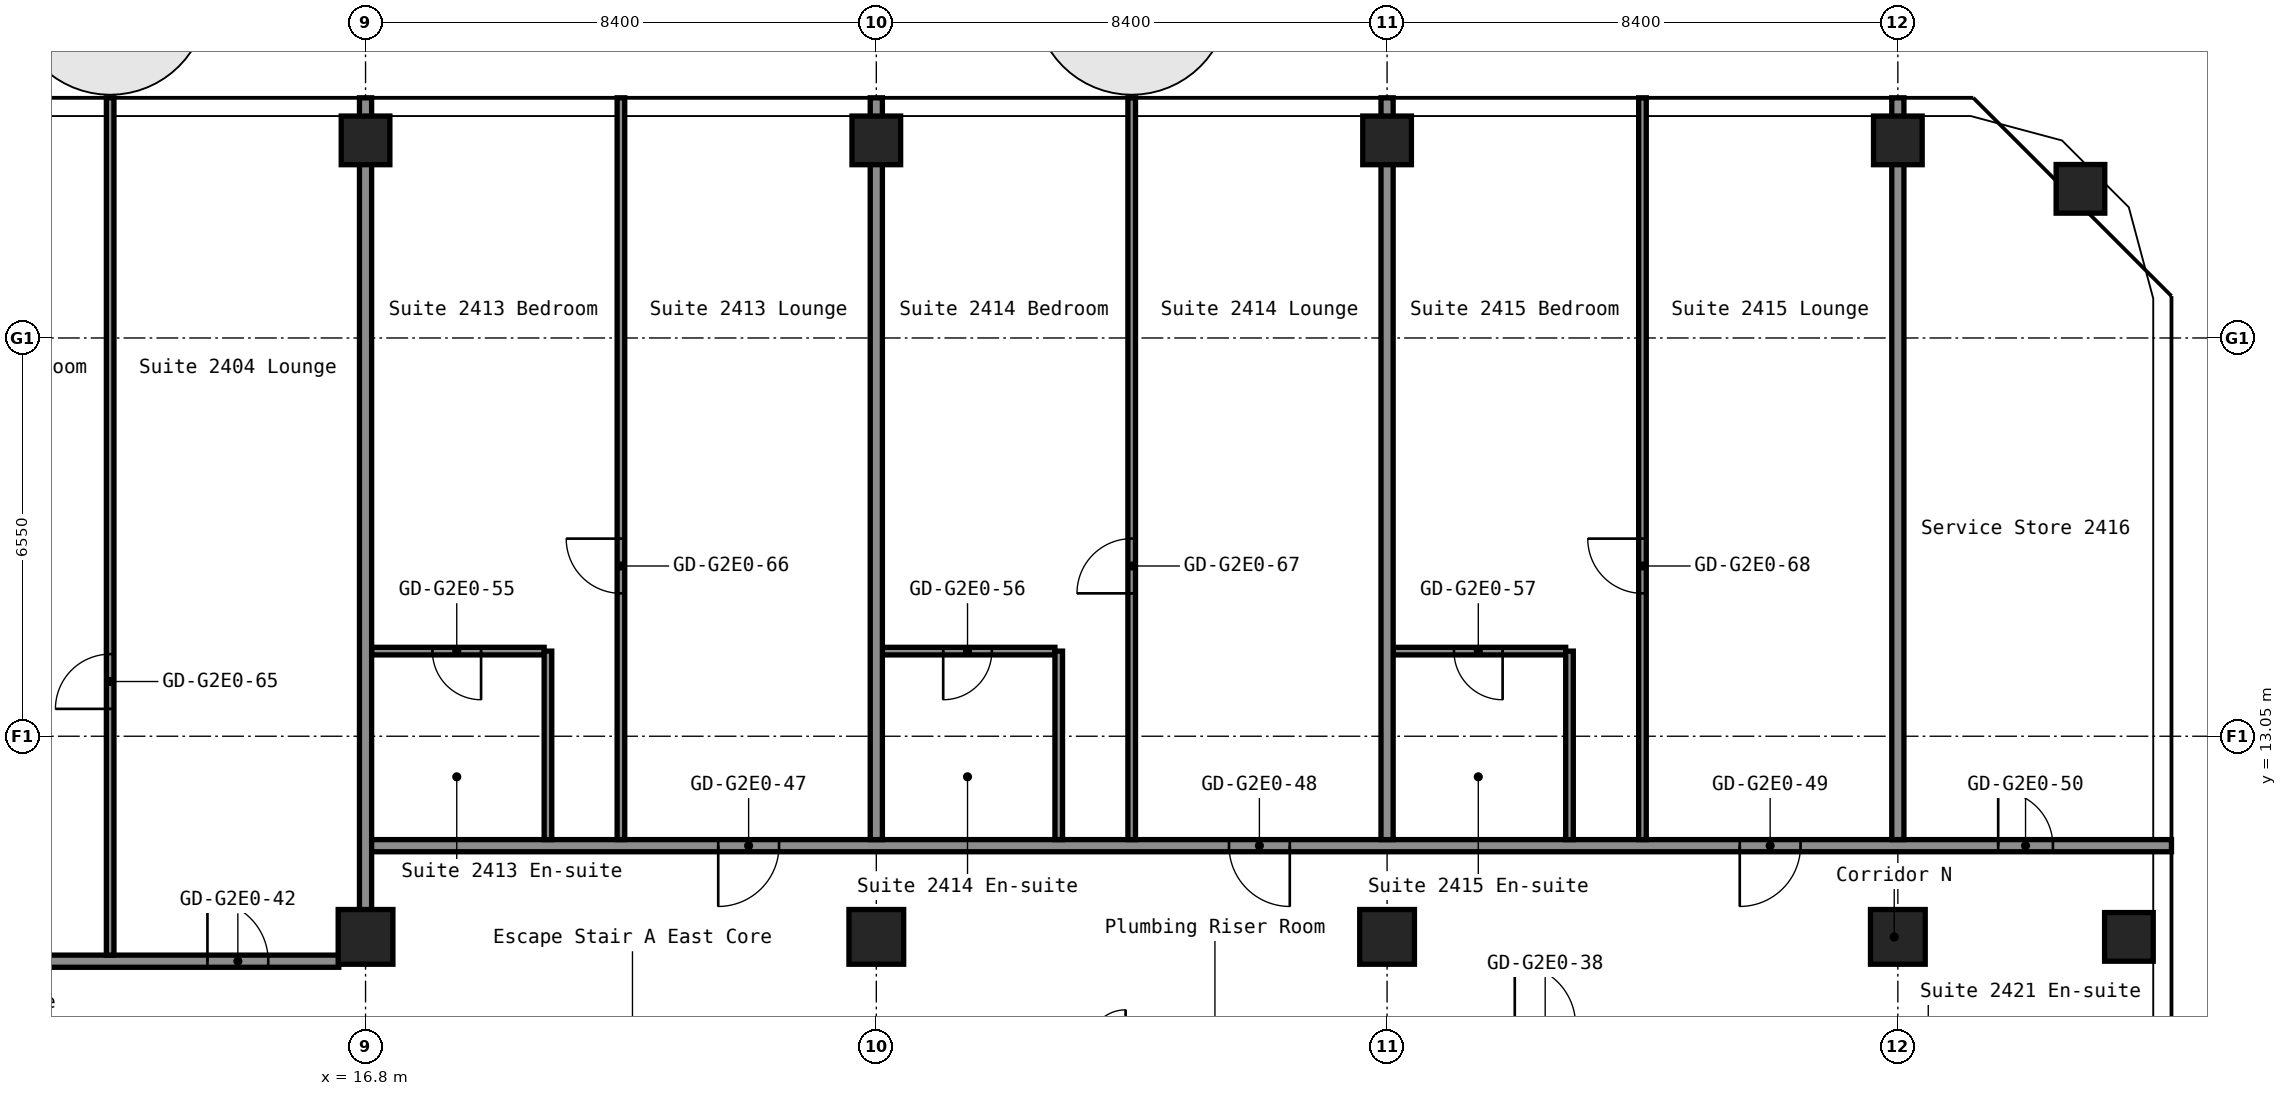
"""IFC4 building model, lengths in metres.
Left out: names, types, materials, properties, quantities, classifications, styles, units other than length and angle.
Written with IfcOpenShell. Run it as: python <this file> out.ifc"""

import sys

from ifc_helpers import new_model, si_unit, direction, frame, frame_2d, origin, origin_2d, place, context, subcontext, project, spatial, rectangle, hollow_rectangle, extrude, element, fill, save


model = new_model("IFC4")
c1 = context("Model", 3, precision=1e-05, world=origin(), true_north=direction((0.0, 1.0)))
c2 = subcontext(c1, "Body", "Model", "MODEL_VIEW")
j1 = project(units=[si_unit("LENGTHUNIT", "METRE"), si_unit("PLANEANGLEUNIT", "RADIAN")], contexts=[c1])
p1 = place(None, origin())
s1 = spatial("IfcSite", under=j1, at=p1, CompositionType="ELEMENT")
p2 = place(p1, origin())
s2 = spatial("IfcBuilding", under=s1, at=p2, CompositionType="ELEMENT")
p3 = place(p2, frame((0.0, 0.0, 88.2)))
s3 = spatial("IfcBuildingStorey", under=s2, at=p3, CompositionType="ELEMENT", Elevation=88.2)
p4 = place(p3, frame((16.8, 9.75, 0.0), z_axis=(0.0, 0.0, 1.0), x_axis=(1.0, 0.0, 0.0)))
e1 = element("IfcColumn", 1, at=p4, inside=s3, PredefinedType="COLUMN", context=c2, shape_type="SweptSolid", body=[
    extrude(hollow_rectangle(XDim=0.9, YDim=0.9, WallThickness=0.036, at=origin_2d()), origin(), (0.0, 0.0, 1.0), 2.8),
])
p5 = place(p3, frame((16.8, 22.85, 0.0), z_axis=(0.0, 0.0, 1.0), x_axis=(1.0, 0.0, 0.0)))
e2 = element("IfcColumn", 2, at=p5, inside=s3, PredefinedType="COLUMN", context=c2, shape_type="SweptSolid", body=[
    extrude(hollow_rectangle(XDim=0.8, YDim=0.8, WallThickness=0.032, at=origin_2d()), origin(), (0.0, 0.0, 1.0), 2.8),
])
p6 = place(p3, frame((25.2, 9.75, 0.0), z_axis=(0.0, 0.0, 1.0), x_axis=(1.0, 0.0, 0.0)))
e3 = element("IfcColumn", 3, at=p6, inside=s3, PredefinedType="COLUMN", context=c2, shape_type="SweptSolid", body=[
    extrude(hollow_rectangle(XDim=0.9, YDim=0.9, WallThickness=0.036, at=origin_2d()), origin(), (0.0, 0.0, 1.0), 2.8),
])
p7 = place(p3, frame((25.2, 22.85, 0.0), z_axis=(0.0, 0.0, 1.0), x_axis=(1.0, 0.0, 0.0)))
e4 = element("IfcColumn", 4, at=p7, inside=s3, PredefinedType="COLUMN", context=c2, shape_type="SweptSolid", body=[
    extrude(hollow_rectangle(XDim=0.8, YDim=0.8, WallThickness=0.032, at=origin_2d()), origin(), (0.0, 0.0, 1.0), 2.8),
])
p8 = place(p3, frame((33.6, 9.75, 0.0), z_axis=(0.0, 0.0, 1.0), x_axis=(1.0, 0.0, 0.0)))
e5 = element("IfcColumn", 5, at=p8, inside=s3, PredefinedType="COLUMN", context=c2, shape_type="SweptSolid", body=[
    extrude(hollow_rectangle(XDim=0.9, YDim=0.9, WallThickness=0.036, at=origin_2d()), origin(), (0.0, 0.0, 1.0), 2.8),
])
p9 = place(p3, frame((33.6, 22.85, 0.0), z_axis=(0.0, 0.0, 1.0), x_axis=(1.0, 0.0, 0.0)))
e6 = element("IfcColumn", 6, at=p9, inside=s3, PredefinedType="COLUMN", context=c2, shape_type="SweptSolid", body=[
    extrude(hollow_rectangle(XDim=0.8, YDim=0.8, WallThickness=0.032, at=origin_2d()), origin(), (0.0, 0.0, 1.0), 2.8),
])
p10 = place(p3, frame((42.0, 9.75, 0.0), z_axis=(0.0, 0.0, 1.0), x_axis=(1.0, 0.0, 0.0)))
e7 = element("IfcColumn", 7, at=p10, inside=s3, PredefinedType="COLUMN", context=c2, shape_type="SweptSolid", body=[
    extrude(hollow_rectangle(XDim=0.9, YDim=0.9, WallThickness=0.036, at=origin_2d()), origin(), (0.0, 0.0, 1.0), 2.8),
])
for number, where, z_axis, x_axis in (
    (8, (42.0, 22.85, 0.0), (0.0, 0.0, 1.0), (1.0, 0.0, 0.0)),
    (9, (45.8, 9.75, 0.0), (0.0, 0.0, 1.0), (1.0, 0.0, 0.0)),
    (10, (45.003, 22.053, 0.0), (0.0, 0.0, 1.0), (1.0, 0.0, 0.0)),
):
    element("IfcColumn", number, at=place(p3, frame(where, z_axis=z_axis, x_axis=x_axis)), inside=s3, PredefinedType="COLUMN", context=c2, shape_type="SweptSolid", body=[
        extrude(hollow_rectangle(XDim=0.8, YDim=0.8, WallThickness=0.032, at=origin_2d()), origin(), (0.0, 0.0, 1.0), 2.8),
    ])
p11 = place(p3, frame((-16.36, 9.35, 0.0), z_axis=(0.0, 0.0, 1.0), x_axis=(1.0, 0.0, 0.0)))
e11 = element("IfcWall", 11, at=p11, inside=s3, PredefinedType="PARTITIONING", context=c2, shape_type="SweptSolid", body=[
    extrude(rectangle(XDim=32.72, YDim=0.2, at=frame_2d((16.36, 0.0))), origin(), (0.0, 0.0, 1.0), 2.8),
])
p12 = place(p11, frame((1.16, 0.0, 0.0)))
e12 = element("IfcOpeningElement", 12, at=p12, cuts=e11, PredefinedType="OPENING", context=c2, shape_type="SweptSolid", body=[
    extrude(rectangle(XDim=1.0, YDim=2.1, at=frame_2d((0.5, 1.05))), frame((0.0, 0.11, 0.0), z_axis=(0.0, -1.0, 0.0), x_axis=(1.0, 0.0, 0.0)), (0.0, 0.0, 1.0), 0.22),
])
p13 = place(p11, frame((9.56, 0.0, 0.0)))
e13 = element("IfcOpeningElement", 13, at=p13, cuts=e11, PredefinedType="OPENING", context=c2, shape_type="SweptSolid", body=[
    extrude(rectangle(XDim=1.0, YDim=2.1, at=frame_2d((0.5, 1.05))), frame((0.0, 0.11, 0.0), z_axis=(0.0, -1.0, 0.0), x_axis=(1.0, 0.0, 0.0)), (0.0, 0.0, 1.0), 0.22),
])
p14 = place(p11, frame((22.16, 0.0, 0.0)))
e14 = element("IfcOpeningElement", 14, at=p14, cuts=e11, PredefinedType="OPENING", context=c2, shape_type="SweptSolid", body=[
    extrude(rectangle(XDim=1.0, YDim=2.1, at=frame_2d((0.5, 1.05))), frame((0.0, 0.11, 0.0), z_axis=(0.0, -1.0, 0.0), x_axis=(1.0, 0.0, 0.0)), (0.0, 0.0, 1.0), 0.22),
])
p15 = place(p11, frame((30.56, 0.0, 0.0)))
e15 = element("IfcOpeningElement", 15, at=p15, cuts=e11, PredefinedType="OPENING", context=c2, shape_type="SweptSolid", body=[
    extrude(rectangle(XDim=1.0, YDim=2.1, at=frame_2d((0.5, 1.05))), frame((0.0, 0.11, 0.0), z_axis=(0.0, -1.0, 0.0), x_axis=(1.0, 0.0, 0.0)), (0.0, 0.0, 1.0), 0.22),
])
p16 = place(p3, frame((16.8, 11.25, 0.0), z_axis=(0.0, 0.0, 1.0), x_axis=(1.0, 0.0, 0.0)))
e16 = element("IfcWall", 16, at=p16, inside=s3, PredefinedType="PARTITIONING", context=c2, shape_type="SweptSolid", body=[
    extrude(rectangle(XDim=29.7, YDim=0.2, at=frame_2d((14.85, 0.0))), origin(), (0.0, 0.0, 1.0), 2.8),
])
p17 = place(p16, frame((5.8, 0.0, 0.0)))
e17 = element("IfcOpeningElement", 17, at=p17, cuts=e16, PredefinedType="OPENING", context=c2, shape_type="SweptSolid", body=[
    extrude(rectangle(XDim=1.0, YDim=2.1, at=frame_2d((0.5, 1.05))), frame((0.0, 0.11, 0.0), z_axis=(0.0, -1.0, 0.0), x_axis=(1.0, 0.0, 0.0)), (0.0, 0.0, 1.0), 0.22),
])
p18 = place(p16, frame((14.2, 0.0, 0.0)))
e18 = element("IfcOpeningElement", 18, at=p18, cuts=e16, PredefinedType="OPENING", context=c2, shape_type="SweptSolid", body=[
    extrude(rectangle(XDim=1.0, YDim=2.1, at=frame_2d((0.5, 1.05))), frame((0.0, 0.11, 0.0), z_axis=(0.0, -1.0, 0.0), x_axis=(1.0, 0.0, 0.0)), (0.0, 0.0, 1.0), 0.22),
])
p19 = place(p16, frame((22.6, 0.0, 0.0)))
e19 = element("IfcOpeningElement", 19, at=p19, cuts=e16, PredefinedType="OPENING", context=c2, shape_type="SweptSolid", body=[
    extrude(rectangle(XDim=1.0, YDim=2.1, at=frame_2d((0.5, 1.05))), frame((0.0, 0.11, 0.0), z_axis=(0.0, -1.0, 0.0), x_axis=(1.0, 0.0, 0.0)), (0.0, 0.0, 1.0), 0.22),
])
p20 = place(p16, frame((26.85, 0.0, 0.0)))
e20 = element("IfcOpeningElement", 20, at=p20, cuts=e16, PredefinedType="OPENING", context=c2, shape_type="SweptSolid", body=[
    extrude(rectangle(XDim=0.9, YDim=2.1, at=frame_2d((0.45, 1.05))), frame((0.0, 0.11, 0.0), z_axis=(0.0, -1.0, 0.0), x_axis=(1.0, 0.0, 0.0)), (0.0, 0.0, 1.0), 0.22),
])
p21 = place(p3, frame((16.9, 14.45, 0.0), z_axis=(0.0, 0.0, 1.0), x_axis=(1.0, 0.0, 0.0)))
e21 = element("IfcWall", 21, at=p21, inside=s3, PredefinedType="PARTITIONING", context=c2, shape_type="SweptSolid", body=[
    extrude(rectangle(XDim=2.838, YDim=0.125, at=frame_2d((1.419, 0.0))), origin(), (0.0, 0.0, 1.0), 2.8),
])
p22 = place(p21, frame((1.0, 0.0, 0.0)))
e22 = element("IfcOpeningElement", 22, at=p22, cuts=e21, PredefinedType="OPENING", context=c2, shape_type="SweptSolid", body=[
    extrude(rectangle(XDim=0.8, YDim=2.1, at=frame_2d((0.4, 1.05))), frame((0.0, 0.073, 0.0), z_axis=(0.0, -1.0, 0.0), x_axis=(1.0, 0.0, 0.0)), (0.0, 0.0, 1.0), 0.145),
])
p23 = place(p3, frame((25.3, 14.45, 0.0), z_axis=(0.0, 0.0, 1.0), x_axis=(1.0, 0.0, 0.0)))
e23 = element("IfcWall", 23, at=p23, inside=s3, PredefinedType="PARTITIONING", context=c2, shape_type="SweptSolid", body=[
    extrude(rectangle(XDim=2.837, YDim=0.125, at=frame_2d((1.419, 0.0))), origin(), (0.0, 0.0, 1.0), 2.8),
])
p24 = place(p23, frame((1.0, 0.0, 0.0)))
e24 = element("IfcOpeningElement", 24, at=p24, cuts=e23, PredefinedType="OPENING", context=c2, shape_type="SweptSolid", body=[
    extrude(rectangle(XDim=0.8, YDim=2.1, at=frame_2d((0.4, 1.05))), frame((0.0, 0.073, 0.0), z_axis=(0.0, -1.0, 0.0), x_axis=(1.0, 0.0, 0.0)), (0.0, 0.0, 1.0), 0.145),
])
p25 = place(p3, frame((33.7, 14.45, 0.0), z_axis=(0.0, 0.0, 1.0), x_axis=(1.0, 0.0, 0.0)))
e25 = element("IfcWall", 25, at=p25, inside=s3, PredefinedType="PARTITIONING", context=c2, shape_type="SweptSolid", body=[
    extrude(rectangle(XDim=2.838, YDim=0.125, at=frame_2d((1.419, 0.0))), origin(), (0.0, 0.0, 1.0), 2.8),
])
p26 = place(p25, frame((1.0, 0.0, 0.0)))
e26 = element("IfcOpeningElement", 26, at=p26, cuts=e25, PredefinedType="OPENING", context=c2, shape_type="SweptSolid", body=[
    extrude(rectangle(XDim=0.8, YDim=2.1, at=frame_2d((0.4, 1.05))), frame((0.0, 0.073, 0.0), z_axis=(0.0, -1.0, 0.0), x_axis=(1.0, 0.0, 0.0)), (0.0, 0.0, 1.0), 0.145),
])
p27 = place(p3, frame((12.6, 9.45, 0.0), z_axis=(0.0, 0.0, 1.0), x_axis=(0.0, 1.0, 0.0)))
e27 = element("IfcWall", 27, at=p27, inside=s3, PredefinedType="PARTITIONING", context=c2, shape_type="SweptSolid", body=[
    extrude(rectangle(XDim=14.1, YDim=0.125, at=frame_2d((7.05, 0.0))), origin(), (0.0, 0.0, 1.0), 2.8),
])
p28 = place(p27, frame((4.05, 0.0, 0.0)))
e28 = element("IfcOpeningElement", 28, at=p28, cuts=e27, PredefinedType="OPENING", context=c2, shape_type="SweptSolid", body=[
    extrude(rectangle(XDim=0.9, YDim=2.1, at=frame_2d((0.45, 1.05))), frame((0.0, 0.073, 0.0), z_axis=(0.0, -1.0, 0.0), x_axis=(1.0, 0.0, 0.0)), (0.0, 0.0, 1.0), 0.145),
])
p29 = place(p3, frame((16.8, 10.19, 0.0), z_axis=(0.0, 0.0, 1.0), x_axis=(0.0, 1.0, 0.0)))
e29 = element("IfcWall", 29, at=p29, inside=s3, PredefinedType="PARTITIONING", context=c2, shape_type="SweptSolid", body=[
    extrude(rectangle(XDim=13.36, YDim=0.2, at=frame_2d((6.68, 0.0))), origin(), (0.0, 0.0, 1.0), 2.8),
])
p30 = place(p3, frame((19.8, 11.35, 0.0), z_axis=(0.0, 0.0, 1.0), x_axis=(0.0, 1.0, 0.0)))
e30 = element("IfcWall", 30, at=p30, inside=s3, PredefinedType="PARTITIONING", context=c2, shape_type="SweptSolid", body=[
    extrude(rectangle(XDim=3.1, YDim=0.125, at=frame_2d((1.55, 0.0))), origin(), (0.0, 0.0, 1.0), 2.8),
])
p31 = place(p3, frame((21.0, 11.35, 0.0), z_axis=(0.0, 0.0, 1.0), x_axis=(0.0, 1.0, 0.0)))
e31 = element("IfcWall", 31, at=p31, inside=s3, PredefinedType="PARTITIONING", context=c2, shape_type="SweptSolid", body=[
    extrude(rectangle(XDim=12.2, YDim=0.125, at=frame_2d((6.1, 0.0))), origin(), (0.0, 0.0, 1.0), 2.8),
])
p32 = place(p31, frame((4.05, 0.0, 0.0)))
e32 = element("IfcOpeningElement", 32, at=p32, cuts=e31, PredefinedType="OPENING", context=c2, shape_type="SweptSolid", body=[
    extrude(rectangle(XDim=0.9, YDim=2.1, at=frame_2d((0.45, 1.05))), frame((0.0, 0.073, 0.0), z_axis=(0.0, -1.0, 0.0), x_axis=(1.0, 0.0, 0.0)), (0.0, 0.0, 1.0), 0.145),
])
p33 = place(p3, frame((25.2, 11.35, 0.0), z_axis=(0.0, 0.0, 1.0), x_axis=(0.0, 1.0, 0.0)))
e33 = element("IfcWall", 33, at=p33, inside=s3, PredefinedType="PARTITIONING", context=c2, shape_type="SweptSolid", body=[
    extrude(rectangle(XDim=12.2, YDim=0.2, at=frame_2d((6.1, 0.0))), origin(), (0.0, 0.0, 1.0), 2.8),
])
p34 = place(p3, frame((28.2, 11.35, 0.0), z_axis=(0.0, 0.0, 1.0), x_axis=(0.0, 1.0, 0.0)))
e34 = element("IfcWall", 34, at=p34, inside=s3, PredefinedType="PARTITIONING", context=c2, shape_type="SweptSolid", body=[
    extrude(rectangle(XDim=3.1, YDim=0.125, at=frame_2d((1.55, 0.0))), origin(), (0.0, 0.0, 1.0), 2.8),
])
p35 = place(p3, frame((29.4, 11.35, 0.0), z_axis=(0.0, 0.0, 1.0), x_axis=(0.0, 1.0, 0.0)))
e35 = element("IfcWall", 35, at=p35, inside=s3, PredefinedType="PARTITIONING", context=c2, shape_type="SweptSolid", body=[
    extrude(rectangle(XDim=12.2, YDim=0.125, at=frame_2d((6.1, 0.0))), origin(), (0.0, 0.0, 1.0), 2.8),
])
p36 = place(p35, frame((4.05, 0.0, 0.0)))
e36 = element("IfcOpeningElement", 36, at=p36, cuts=e35, PredefinedType="OPENING", context=c2, shape_type="SweptSolid", body=[
    extrude(rectangle(XDim=0.9, YDim=2.1, at=frame_2d((0.45, 1.05))), frame((0.0, 0.073, 0.0), z_axis=(0.0, -1.0, 0.0), x_axis=(1.0, 0.0, 0.0)), (0.0, 0.0, 1.0), 0.145),
])
p37 = place(p3, frame((33.6, 11.35, 0.0), z_axis=(0.0, 0.0, 1.0), x_axis=(0.0, 1.0, 0.0)))
e37 = element("IfcWall", 37, at=p37, inside=s3, PredefinedType="PARTITIONING", context=c2, shape_type="SweptSolid", body=[
    extrude(rectangle(XDim=12.2, YDim=0.2, at=frame_2d((6.1, 0.0))), origin(), (0.0, 0.0, 1.0), 2.8),
])
p38 = place(p3, frame((36.6, 11.35, 0.0), z_axis=(0.0, 0.0, 1.0), x_axis=(0.0, 1.0, 0.0)))
e38 = element("IfcWall", 38, at=p38, inside=s3, PredefinedType="PARTITIONING", context=c2, shape_type="SweptSolid", body=[
    extrude(rectangle(XDim=3.1, YDim=0.125, at=frame_2d((1.55, 0.0))), origin(), (0.0, 0.0, 1.0), 2.8),
])
p39 = place(p3, frame((37.8, 11.35, 0.0), z_axis=(0.0, 0.0, 1.0), x_axis=(0.0, 1.0, 0.0)))
e39 = element("IfcWall", 39, at=p39, inside=s3, PredefinedType="PARTITIONING", context=c2, shape_type="SweptSolid", body=[
    extrude(rectangle(XDim=12.2, YDim=0.125, at=frame_2d((6.1, 0.0))), origin(), (0.0, 0.0, 1.0), 2.8),
])
p40 = place(p39, frame((4.05, 0.0, 0.0)))
e40 = element("IfcOpeningElement", 40, at=p40, cuts=e39, PredefinedType="OPENING", context=c2, shape_type="SweptSolid", body=[
    extrude(rectangle(XDim=0.9, YDim=2.1, at=frame_2d((0.45, 1.05))), frame((0.0, 0.073, 0.0), z_axis=(0.0, -1.0, 0.0), x_axis=(1.0, 0.0, 0.0)), (0.0, 0.0, 1.0), 0.145),
])
p41 = place(p3, frame((42.0, 11.35, 0.0), z_axis=(0.0, 0.0, 1.0), x_axis=(0.0, 1.0, 0.0)))
e41 = element("IfcWall", 41, at=p41, inside=s3, PredefinedType="PARTITIONING", context=c2, shape_type="SweptSolid", body=[
    extrude(rectangle(XDim=12.2, YDim=0.2, at=frame_2d((6.1, 0.0))), origin(), (0.0, 0.0, 1.0), 2.8),
])
p42 = place(p15, origin())
e42 = element("IfcDoor", 42, at=p42, inside=s3, OperationType="SINGLE_SWING_RIGHT", PredefinedType="DOOR", context=c2, shape_type="SweptSolid", body=[
    extrude(rectangle(XDim=1.0, YDim=2.1, at=frame_2d((0.5, 1.05))), frame((0.0, 0.025, 0.0), z_axis=(0.0, -1.0, 0.0), x_axis=(1.0, 0.0, 0.0)), (0.0, 0.0, 1.0), 0.05),
])
fill(e15, e42)
p43 = place(p17, origin())
e43 = element("IfcDoor", 43, at=p43, inside=s3, OperationType="SINGLE_SWING_LEFT", PredefinedType="DOOR", context=c2, shape_type="SweptSolid", body=[
    extrude(rectangle(XDim=1.0, YDim=2.1, at=frame_2d((0.5, 1.05))), frame((0.0, 0.025, 0.0), z_axis=(0.0, -1.0, 0.0), x_axis=(1.0, 0.0, 0.0)), (0.0, 0.0, 1.0), 0.05),
])
fill(e17, e43)
p44 = place(p18, origin())
e44 = element("IfcDoor", 44, at=p44, inside=s3, OperationType="SINGLE_SWING_RIGHT", PredefinedType="DOOR", context=c2, shape_type="SweptSolid", body=[
    extrude(rectangle(XDim=1.0, YDim=2.1, at=frame_2d((0.5, 1.05))), frame((0.0, 0.025, 0.0), z_axis=(0.0, -1.0, 0.0), x_axis=(1.0, 0.0, 0.0)), (0.0, 0.0, 1.0), 0.05),
])
fill(e18, e44)
p45 = place(p19, origin())
e45 = element("IfcDoor", 45, at=p45, inside=s3, OperationType="SINGLE_SWING_LEFT", PredefinedType="DOOR", context=c2, shape_type="SweptSolid", body=[
    extrude(rectangle(XDim=1.0, YDim=2.1, at=frame_2d((0.5, 1.05))), frame((0.0, 0.025, 0.0), z_axis=(0.0, -1.0, 0.0), x_axis=(1.0, 0.0, 0.0)), (0.0, 0.0, 1.0), 0.05),
])
fill(e19, e45)
p46 = place(p20, origin())
e46 = element("IfcDoor", 46, at=p46, inside=s3, OperationType="SINGLE_SWING_RIGHT", PredefinedType="DOOR", context=c2, shape_type="SweptSolid", body=[
    extrude(rectangle(XDim=0.9, YDim=2.1, at=frame_2d((0.45, 1.05))), frame((0.0, 0.025, 0.0), z_axis=(0.0, -1.0, 0.0), x_axis=(1.0, 0.0, 0.0)), (0.0, 0.0, 1.0), 0.05),
])
fill(e20, e46)
p47 = place(p22, origin())
e47 = element("IfcDoor", 47, at=p47, inside=s3, OperationType="SINGLE_SWING_RIGHT", PredefinedType="DOOR", context=c2, shape_type="SweptSolid", body=[
    extrude(rectangle(XDim=0.8, YDim=2.1, at=frame_2d((0.4, 1.05))), frame((0.0, 0.025, 0.0), z_axis=(0.0, -1.0, 0.0), x_axis=(1.0, 0.0, 0.0)), (0.0, 0.0, 1.0), 0.05),
])
fill(e22, e47)
p48 = place(p24, origin())
e48 = element("IfcDoor", 48, at=p48, inside=s3, OperationType="SINGLE_SWING_LEFT", PredefinedType="DOOR", context=c2, shape_type="SweptSolid", body=[
    extrude(rectangle(XDim=0.8, YDim=2.1, at=frame_2d((0.4, 1.05))), frame((0.0, 0.025, 0.0), z_axis=(0.0, -1.0, 0.0), x_axis=(1.0, 0.0, 0.0)), (0.0, 0.0, 1.0), 0.05),
])
fill(e24, e48)
p49 = place(p26, origin())
e49 = element("IfcDoor", 49, at=p49, inside=s3, OperationType="SINGLE_SWING_RIGHT", PredefinedType="DOOR", context=c2, shape_type="SweptSolid", body=[
    extrude(rectangle(XDim=0.8, YDim=2.1, at=frame_2d((0.4, 1.05))), frame((0.0, 0.025, 0.0), z_axis=(0.0, -1.0, 0.0), x_axis=(1.0, 0.0, 0.0)), (0.0, 0.0, 1.0), 0.05),
])
fill(e26, e49)
p50 = place(p28, origin())
e50 = element("IfcDoor", 50, at=p50, inside=s3, OperationType="SINGLE_SWING_RIGHT", PredefinedType="DOOR", context=c2, shape_type="SweptSolid", body=[
    extrude(rectangle(XDim=0.9, YDim=2.1, at=frame_2d((0.45, 1.05))), frame((0.0, 0.025, 0.0), z_axis=(0.0, -1.0, 0.0), x_axis=(1.0, 0.0, 0.0)), (0.0, 0.0, 1.0), 0.05),
])
fill(e28, e50)
p51 = place(p32, origin())
e51 = element("IfcDoor", 51, at=p51, inside=s3, OperationType="SINGLE_SWING_LEFT", PredefinedType="DOOR", context=c2, shape_type="SweptSolid", body=[
    extrude(rectangle(XDim=0.9, YDim=2.1, at=frame_2d((0.45, 1.05))), frame((0.0, 0.025, 0.0), z_axis=(0.0, -1.0, 0.0), x_axis=(1.0, 0.0, 0.0)), (0.0, 0.0, 1.0), 0.05),
])
fill(e32, e51)
p52 = place(p36, origin())
e52 = element("IfcDoor", 52, at=p52, inside=s3, OperationType="SINGLE_SWING_RIGHT", PredefinedType="DOOR", context=c2, shape_type="SweptSolid", body=[
    extrude(rectangle(XDim=0.9, YDim=2.1, at=frame_2d((0.45, 1.05))), frame((0.0, 0.025, 0.0), z_axis=(0.0, -1.0, 0.0), x_axis=(1.0, 0.0, 0.0)), (0.0, 0.0, 1.0), 0.05),
])
fill(e36, e52)
p53 = place(p40, origin())
e53 = element("IfcDoor", 53, at=p53, inside=s3, OperationType="SINGLE_SWING_LEFT", PredefinedType="DOOR", context=c2, shape_type="SweptSolid", body=[
    extrude(rectangle(XDim=0.9, YDim=2.1, at=frame_2d((0.45, 1.05))), frame((0.0, 0.025, 0.0), z_axis=(0.0, -1.0, 0.0), x_axis=(1.0, 0.0, 0.0)), (0.0, 0.0, 1.0), 0.05),
])
fill(e40, e53)
save(model, sys.argv[1])
